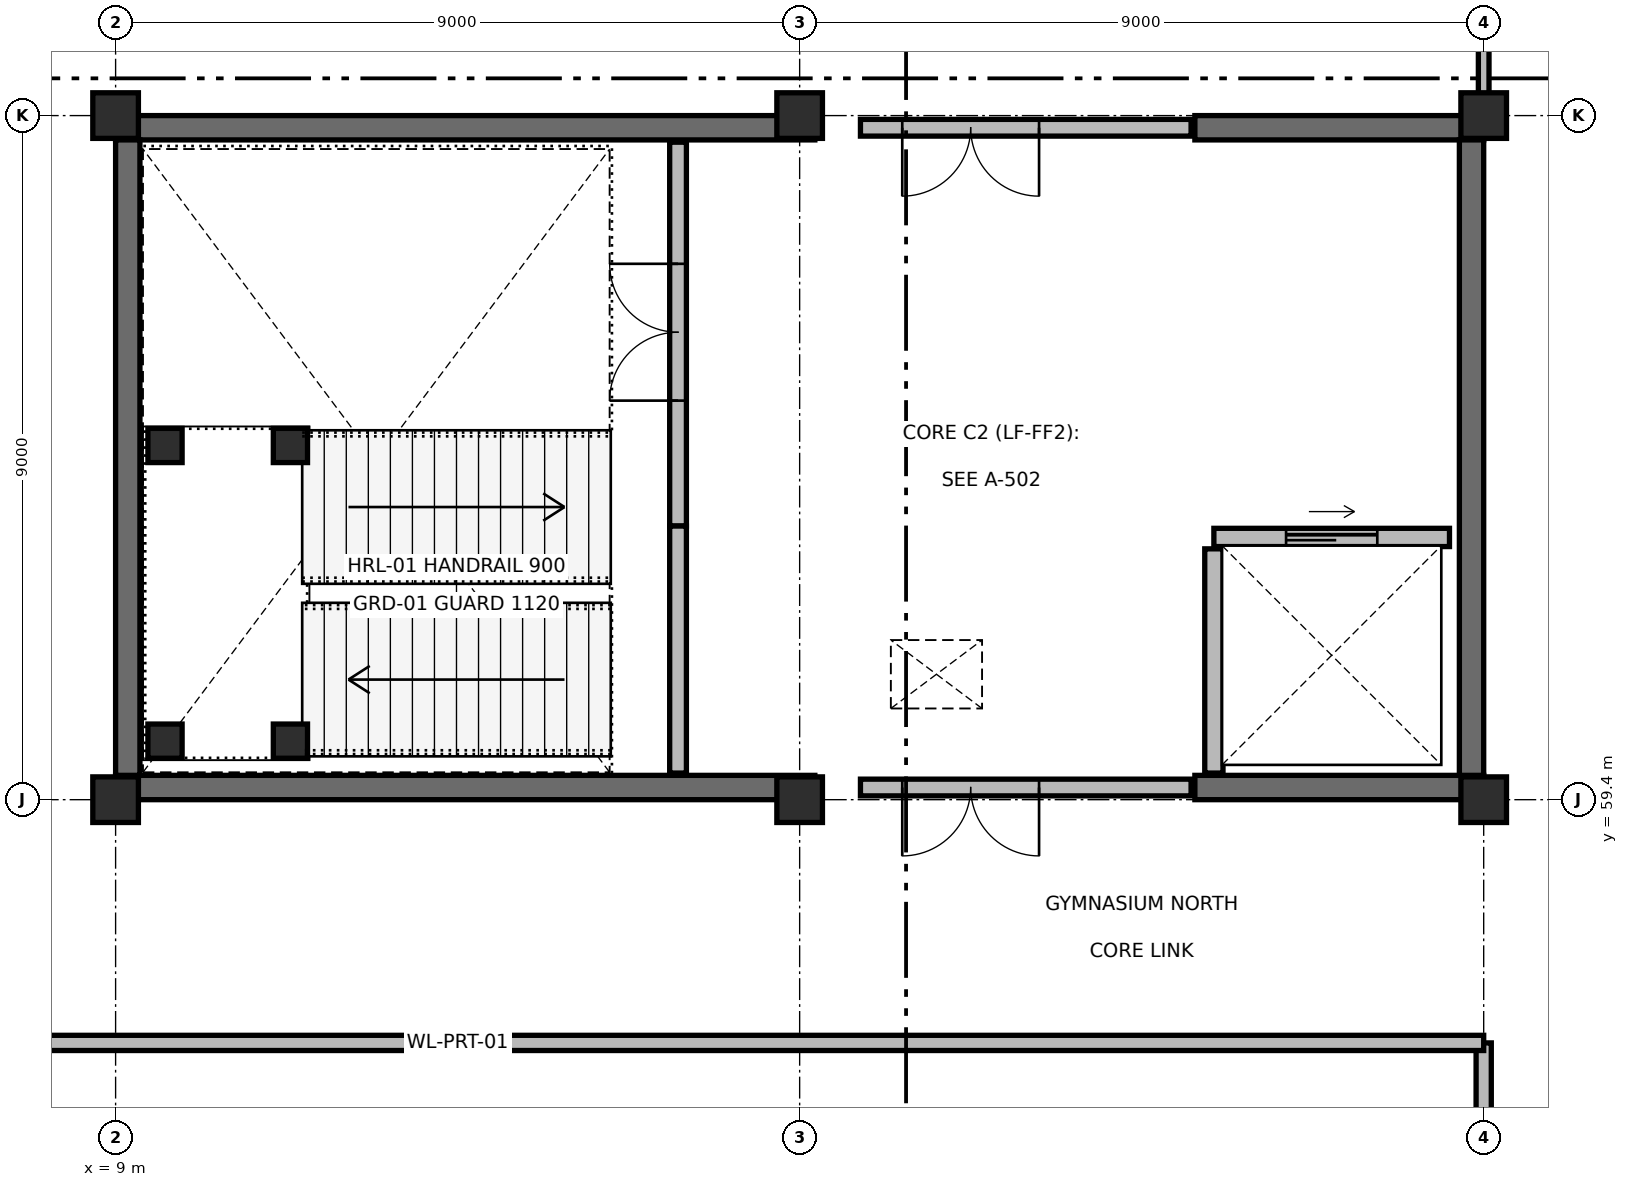
"""IFC4 building model, lengths in metres.
Left out: names, types, materials, properties, quantities, classifications, styles, units other than length and angle.
Written with IfcOpenShell. Run it as: python <this file> out.ifc"""

import sys

from ifc_helpers import new_model, si_unit, direction, frame, frame_2d, origin, origin_2d, place, context, subcontext, project, spatial, rectangle, extrude, element, fill, save


model = new_model("IFC4")
c1 = context("Model", 3, precision=1e-05, world=origin(), true_north=direction((0.0, 1.0)))
c2 = subcontext(c1, "Body", "Model", "MODEL_VIEW")
j1 = project(units=[si_unit("LENGTHUNIT", "METRE"), si_unit("PLANEANGLEUNIT", "RADIAN")], contexts=[c1])
p1 = place(None, origin())
s1 = spatial("IfcSite", under=j1, at=p1, CompositionType="ELEMENT")
p2 = place(p1, origin())
s2 = spatial("IfcBuilding", under=s1, at=p2, CompositionType="ELEMENT")
p3 = place(p2, frame((0.0, 0.0, 9.6)))
s3 = spatial("IfcBuildingStorey", under=s2, at=p3, CompositionType="ELEMENT", Elevation=9.6)
for number, where, z_axis, x_axis in (
    (1, (9.0, 59.4, 0.0), (0.0, 0.0, 1.0), (1.0, 0.0, 0.0)),
    (2, (9.0, 68.4, 0.0), (0.0, 0.0, 1.0), (1.0, 0.0, 0.0)),
    (3, (18.0, 59.4, 0.0), (0.0, 0.0, 1.0), (1.0, 0.0, 0.0)),
    (4, (18.0, 68.4, 0.0), (0.0, 0.0, 1.0), (1.0, 0.0, 0.0)),
    (5, (27.0, 59.4, 0.0), (0.0, 0.0, 1.0), (1.0, 0.0, 0.0)),
    (6, (27.0, 68.4, 0.0), (0.0, 0.0, 1.0), (1.0, 0.0, 0.0)),
):
    element("IfcColumn", number, at=place(p3, frame(where, z_axis=z_axis, x_axis=x_axis)), inside=s3, PredefinedType="COLUMN", context=c2, shape_type="SweptSolid", body=[
        extrude(rectangle(XDim=0.6, YDim=0.6, at=origin_2d()), origin(), (0.0, 0.0, 1.0), 4.5),
    ])
p4 = place(p3, frame((9.0, 59.56, 0.0), z_axis=(0.0, 0.0, 1.0), x_axis=(1.0, 0.0, 0.0)))
e7 = element("IfcWall", 7, at=p4, inside=s3, PredefinedType="SHEAR", context=c2, shape_type="SweptSolid", body=[
    extrude(rectangle(XDim=9.2, YDim=0.32, at=frame_2d((4.6, 0.0))), origin(), (0.0, 0.0, 1.0), 4.5),
])
p5 = place(p3, frame((23.2, 59.56, 0.0), z_axis=(0.0, 0.0, 1.0), x_axis=(1.0, 0.0, 0.0)))
e8 = element("IfcWall", 8, at=p5, inside=s3, PredefinedType="SHEAR", context=c2, shape_type="SweptSolid", body=[
    extrude(rectangle(XDim=3.8, YDim=0.32, at=frame_2d((1.9, 0.0))), origin(), (0.0, 0.0, 1.0), 4.5),
])
p6 = place(p3, frame((9.0, 68.24, 0.0), z_axis=(0.0, 0.0, 1.0), x_axis=(1.0, 0.0, 0.0)))
e9 = element("IfcWall", 9, at=p6, inside=s3, PredefinedType="SHEAR", context=c2, shape_type="SweptSolid", body=[
    extrude(rectangle(XDim=9.2, YDim=0.32, at=frame_2d((4.6, 0.0))), origin(), (0.0, 0.0, 1.0), 4.5),
])
p7 = place(p3, frame((23.2, 68.24, 0.0), z_axis=(0.0, 0.0, 1.0), x_axis=(1.0, 0.0, 0.0)))
e10 = element("IfcWall", 10, at=p7, inside=s3, PredefinedType="SHEAR", context=c2, shape_type="SweptSolid", body=[
    extrude(rectangle(XDim=3.8, YDim=0.32, at=frame_2d((1.9, 0.0))), origin(), (0.0, 0.0, 1.0), 4.5),
])
for number, where, z_axis, x_axis in (
    (11, (9.16, 59.72, 0.0), (0.0, 0.0, 1.0), (0.0, 1.0, 0.0)),
    (12, (26.84, 59.72, 0.0), (0.0, 0.0, 1.0), (0.0, 1.0, 0.0)),
):
    element("IfcWall", number, at=place(p3, frame(where, z_axis=z_axis, x_axis=x_axis)), inside=s3, PredefinedType="SHEAR", context=c2, shape_type="SweptSolid", body=[
        extrude(rectangle(XDim=8.36, YDim=0.32, at=frame_2d((4.18, 0.0))), origin(), (0.0, 0.0, 1.0), 4.5),
    ])
p8 = place(p3, frame((16.4, 68.05, 0.0), z_axis=(0.0, 0.0, 1.0), x_axis=(0.0, -1.0, 0.0)))
e13 = element("IfcWall", 13, at=p8, inside=s3, PredefinedType="PARTITIONING", context=c2, shape_type="SweptSolid", body=[
    extrude(rectangle(XDim=5.05, YDim=0.22, at=frame_2d((2.525, 0.0))), origin(), (0.0, 0.0, 1.0), 3.575),
])
p9 = place(p8, frame((1.6, 0.0, 0.0)))
e14 = element("IfcOpeningElement", 14, at=p9, cuts=e13, PredefinedType="OPENING", context=c2, shape_type="SweptSolid", body=[
    extrude(rectangle(XDim=1.8, YDim=2.2, at=frame_2d((0.9, 1.1))), frame((0.0, 0.12, 0.0), z_axis=(0.0, -1.0, 0.0), x_axis=(1.0, 0.0, 0.0)), (0.0, 0.0, 1.0), 0.24),
])
p10 = place(p3, frame((16.4, 59.75, 0.0), z_axis=(0.0, 0.0, 1.0), x_axis=(0.0, 1.0, 0.0)))
e15 = element("IfcWall", 15, at=p10, inside=s3, PredefinedType="PARTITIONING", context=c2, shape_type="SweptSolid", body=[
    extrude(rectangle(XDim=3.25, YDim=0.22, at=frame_2d((1.625, 0.0))), origin(), (0.0, 0.0, 1.0), 3.575),
])
p11 = place(p3, frame((23.45, 62.85, 0.0), z_axis=(0.0, 0.0, 1.0), x_axis=(1.0, 0.0, 0.0)))
e16 = element("IfcWall", 16, at=p11, inside=s3, PredefinedType="SOLIDWALL", context=c2, shape_type="SweptSolid", body=[
    extrude(rectangle(XDim=3.1, YDim=0.24, at=frame_2d((1.55, 0.0))), origin(), (0.0, 0.0, 1.0), 4.205),
])
p12 = place(p11, frame((0.95, 0.0, 0.0)))
e17 = element("IfcOpeningElement", 17, at=p12, cuts=e16, PredefinedType="OPENING", context=c2, shape_type="SweptSolid", body=[
    extrude(rectangle(XDim=1.2, YDim=2.2, at=frame_2d((0.6, 1.1))), frame((0.0, 0.13, 0.0), z_axis=(0.0, -1.0, 0.0), x_axis=(1.0, 0.0, 0.0)), (0.0, 0.0, 1.0), 0.26),
])
p13 = place(p3, frame((23.45, 59.75, 0.0), z_axis=(0.0, 0.0, 1.0), x_axis=(0.0, 1.0, 0.0)))
e18 = element("IfcWall", 18, at=p13, inside=s3, PredefinedType="SOLIDWALL", context=c2, shape_type="SweptSolid", body=[
    extrude(rectangle(XDim=2.95, YDim=0.24, at=frame_2d((1.475, 0.0))), origin(), (0.0, 0.0, 1.0), 3.575),
])
p14 = place(p3, frame((18.8, 59.56, 0.0), z_axis=(0.0, 0.0, 1.0), x_axis=(1.0, 0.0, 0.0)))
e19 = element("IfcWall", 19, at=p14, inside=s3, PredefinedType="PARTITIONING", context=c2, shape_type="SweptSolid", body=[
    extrude(rectangle(XDim=4.35, YDim=0.22, at=frame_2d((2.175, 0.0))), origin(), (0.0, 0.0, 1.0), 3.575),
])
p15 = place(p14, frame((0.55, 0.0, 0.0)))
e20 = element("IfcOpeningElement", 20, at=p15, cuts=e19, PredefinedType="OPENING", context=c2, shape_type="SweptSolid", body=[
    extrude(rectangle(XDim=1.8, YDim=2.2, at=frame_2d((0.9, 1.1))), frame((0.0, 0.12, 0.0), z_axis=(0.0, -1.0, 0.0), x_axis=(1.0, 0.0, 0.0)), (0.0, 0.0, 1.0), 0.24),
])
p16 = place(p3, frame((18.8, 68.24, 0.0), z_axis=(0.0, 0.0, 1.0), x_axis=(1.0, 0.0, 0.0)))
e21 = element("IfcWall", 21, at=p16, inside=s3, PredefinedType="PARTITIONING", context=c2, shape_type="SweptSolid", body=[
    extrude(rectangle(XDim=4.35, YDim=0.22, at=frame_2d((2.175, 0.0))), origin(), (0.0, 0.0, 1.0), 3.575),
])
p17 = place(p16, frame((0.55, 0.0, 0.0)))
e22 = element("IfcOpeningElement", 22, at=p17, cuts=e21, PredefinedType="OPENING", context=c2, shape_type="SweptSolid", body=[
    extrude(rectangle(XDim=1.8, YDim=2.2, at=frame_2d((0.9, 1.1))), frame((0.0, 0.12, 0.0), z_axis=(0.0, -1.0, 0.0), x_axis=(1.0, 0.0, 0.0)), (0.0, 0.0, 1.0), 0.24),
])
p18 = place(p3, frame((27.0, 25.4, 0.0), z_axis=(0.0, 0.0, 1.0), x_axis=(0.0, 1.0, 0.0)))
e23 = element("IfcWall", 23, at=p18, inside=s3, PredefinedType="PARTITIONING", context=c2, shape_type="SweptSolid", body=[
    extrude(rectangle(XDim=30.8, YDim=0.2, at=frame_2d((15.4, 0.0))), origin(), (0.0, 0.0, 1.0), 3.475),
])
p19 = place(p18, frame((8.099, 0.0, 0.0)))
e24 = element("IfcOpeningElement", 24, at=p19, cuts=e23, PredefinedType="OPENING", context=c2, shape_type="SweptSolid", body=[
    extrude(rectangle(XDim=1.05, YDim=2.15, at=frame_2d((0.525, 1.075))), frame((0.0, 0.11, 0.0), z_axis=(0.0, -1.0, 0.0), x_axis=(1.0, 0.0, 0.0)), (0.0, 0.0, 1.0), 0.22),
])
p20 = place(p3, frame((0.0, 56.2, 0.0), z_axis=(0.0, 0.0, 1.0), x_axis=(1.0, 0.0, 0.0)))
e25 = element("IfcWall", 25, at=p20, inside=s3, PredefinedType="PARTITIONING", context=c2, shape_type="SweptSolid", body=[
    extrude(rectangle(XDim=27.0, YDim=0.2, at=frame_2d((13.5, 0.0))), origin(), (0.0, 0.0, 1.0), 3.475),
])
p21 = place(p3, frame((27.0, 68.4, 0.0), z_axis=(0.0, 0.0, 1.0), x_axis=(0.0, 1.0, 0.0)))
e26 = element("IfcWall", 26, at=p21, inside=s3, PredefinedType="PARTITIONING", context=c2, shape_type="SweptSolid", body=[
    extrude(rectangle(XDim=36.0, YDim=0.14, at=frame_2d((18.0, 0.0))), origin(), (0.0, 0.0, 1.0), 3.475),
])
p22 = place(p21, frame((13.205, 0.0, 0.0)))
e27 = element("IfcOpeningElement", 27, at=p22, cuts=e26, PredefinedType="OPENING", context=c2, shape_type="SweptSolid", body=[
    extrude(rectangle(XDim=0.95, YDim=2.1, at=frame_2d((0.475, 1.05))), frame((0.0, 0.08, 0.0), z_axis=(0.0, -1.0, 0.0), x_axis=(1.0, 0.0, 0.0)), (0.0, 0.0, 1.0), 0.16),
])
for number, where, z_axis, x_axis in (
    (28, (9.65, 60.17, 0.0), (0.0, 0.0, 1.0), (1.0, 0.0, 0.0)),
    (29, (11.3, 60.17, 0.0), (0.0, 0.0, 1.0), (1.0, 0.0, 0.0)),
    (30, (9.65, 64.06, 0.0), (0.0, 0.0, 1.0), (1.0, 0.0, 0.0)),
    (31, (11.3, 64.06, 0.0), (0.0, 0.0, 1.0), (1.0, 0.0, 0.0)),
):
    element("IfcColumn", number, at=place(p3, frame(where, z_axis=z_axis, x_axis=x_axis)), inside=s3, PredefinedType="COLUMN", context=c2, shape_type="SweptSolid", body=[
        extrude(rectangle(XDim=0.45, YDim=0.45, at=origin_2d()), origin(), (0.0, 0.0, 1.0), 4.5),
    ])
p23 = place(p9, origin())
e32 = element("IfcDoor", 32, at=p23, inside=s3, OperationType="DOUBLE_DOOR_SINGLE_SWING", PredefinedType="DOOR", context=c2, shape_type="SweptSolid", body=[
    extrude(rectangle(XDim=1.8, YDim=2.2, at=frame_2d((0.9, 1.1))), frame((0.0, 0.025, 0.0), z_axis=(0.0, -1.0, 0.0), x_axis=(1.0, 0.0, 0.0)), (0.0, 0.0, 1.0), 0.05),
])
fill(e14, e32)
p24 = place(p12, origin())
e33 = element("IfcDoor", 33, at=p24, inside=s3, OperationType="DOUBLE_DOOR_SLIDING", PredefinedType="DOOR", context=c2, shape_type="SweptSolid", body=[
    extrude(rectangle(XDim=1.2, YDim=2.2, at=frame_2d((0.6, 1.1))), frame((0.0, 0.025, 0.0), z_axis=(0.0, -1.0, 0.0), x_axis=(1.0, 0.0, 0.0)), (0.0, 0.0, 1.0), 0.05),
])
fill(e17, e33)
p25 = place(p15, origin())
e34 = element("IfcDoor", 34, at=p25, inside=s3, OperationType="DOUBLE_DOOR_SINGLE_SWING", PredefinedType="DOOR", context=c2, shape_type="SweptSolid", body=[
    extrude(rectangle(XDim=1.8, YDim=2.2, at=frame_2d((0.9, 1.1))), frame((0.0, 0.025, 0.0), z_axis=(0.0, -1.0, 0.0), x_axis=(1.0, 0.0, 0.0)), (0.0, 0.0, 1.0), 0.05),
])
fill(e20, e34)
p26 = place(p17, origin())
e35 = element("IfcDoor", 35, at=p26, inside=s3, OperationType="DOUBLE_DOOR_SINGLE_SWING", PredefinedType="DOOR", context=c2, shape_type="SweptSolid", body=[
    extrude(rectangle(XDim=1.8, YDim=2.2, at=frame_2d((0.9, 1.1))), frame((0.0, 0.025, 0.0), z_axis=(0.0, -1.0, 0.0), x_axis=(1.0, 0.0, 0.0)), (0.0, 0.0, 1.0), 0.05),
])
fill(e22, e35)
save(model, sys.argv[1])
